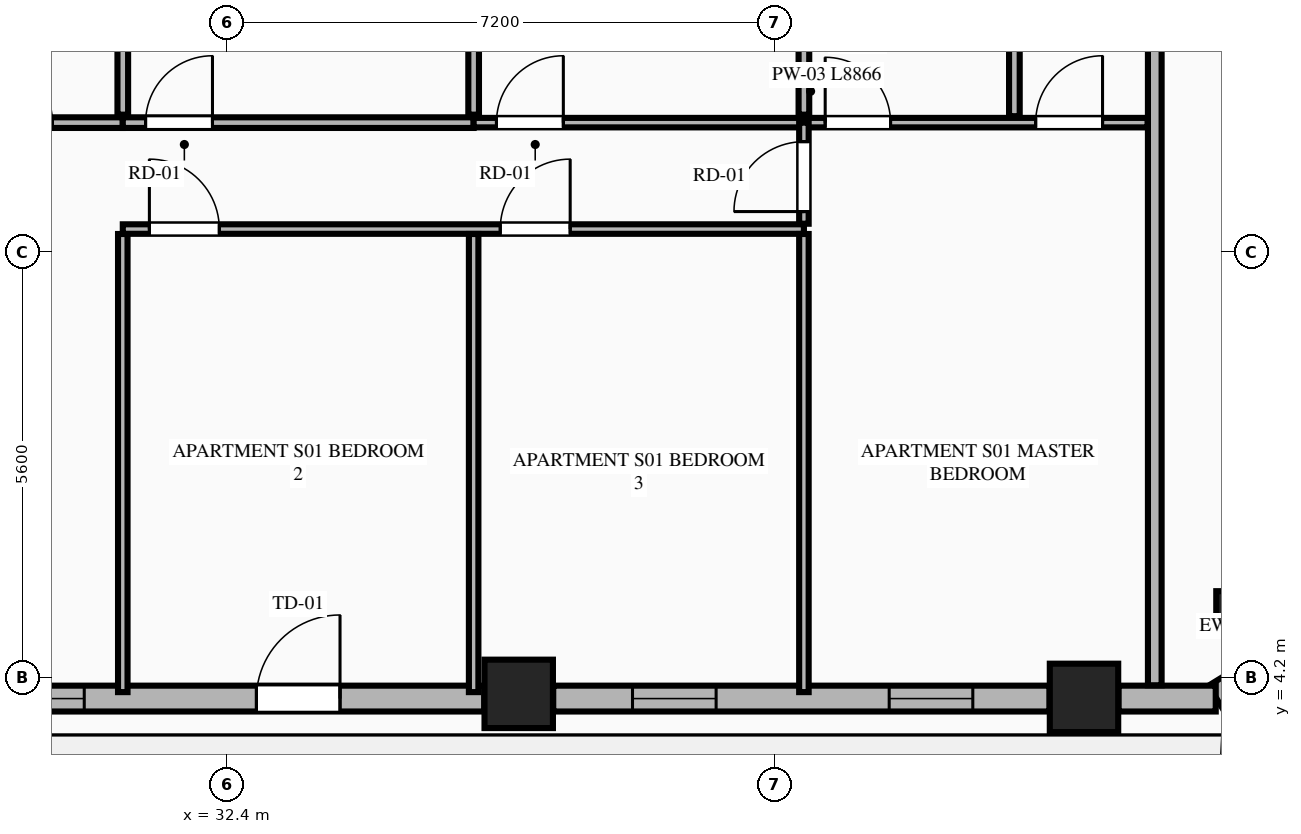
"""IFC4 building model, lengths in metres.
Left out: names, types, materials, properties, quantities, classifications, styles, units other than length and angle.
Written with IfcOpenShell. Run it as: python <this file> out.ifc"""

import sys

from ifc_helpers import new_model, si_unit, direction, frame, frame_2d, origin, origin_2d, place, context, subcontext, project, spatial, rectangle, extrude, element, fill, save


model = new_model("IFC4")
c1 = context("Model", 3, precision=1e-05, world=origin(), true_north=direction((0.0, 1.0)))
c2 = subcontext(c1, "Body", "Model", "MODEL_VIEW")
j1 = project(units=[si_unit("LENGTHUNIT", "METRE"), si_unit("PLANEANGLEUNIT", "RADIAN")], contexts=[c1])
p1 = place(None, origin())
s1 = spatial("IfcSite", under=j1, at=p1, CompositionType="ELEMENT")
p2 = place(p1, origin())
s2 = spatial("IfcBuilding", under=s1, at=p2, CompositionType="ELEMENT")
p3 = place(p2, frame((0.0, 0.0, 160.6)))
s3 = spatial("IfcBuildingStorey", under=s2, at=p3, CompositionType="ELEMENT", Elevation=160.6)
for number, where, z_axis, x_axis in (
    (1, (36.232, 3.992, 0.0), (0.0, 0.0, 1.0), (1.0, 0.0, 0.0)),
    (2, (43.669, 3.939, 0.0), (0.0, 0.0, 1.0), (1.0, 0.0, 0.0)),
):
    element("IfcColumn", number, at=place(p3, frame(where, z_axis=z_axis, x_axis=x_axis)), inside=s3, PredefinedType="COLUMN", context=c2, shape_type="SweptSolid", body=[
        extrude(rectangle(XDim=0.9, YDim=0.9, at=origin_2d()), origin(), (0.0, 0.0, 1.0), 3.55),
    ])
p4 = place(p3, frame((45.659, 5.093, 0.0), z_axis=(0.0, 0.0, 1.0), x_axis=(0.865160173452, 0.501495637342, 0.0)))
e3 = element("IfcColumn", 3, at=p4, inside=s3, PredefinedType="PILASTER", context=c2, shape_type="SweptSolid", body=[
    extrude(rectangle(XDim=0.5, YDim=0.35, at=origin_2d()), origin(), (0.0, 0.0, 1.0), 3.55),
])
p5 = place(p3, frame((45.397, 3.955, 0.0), z_axis=(0.0, 0.0, 1.0), x_axis=(0.851798915137, 0.523868884523, 0.0)))
e4 = element("IfcWall", 4, at=p5, inside=s3, PredefinedType="STANDARD", context=c2, shape_type="SweptSolid", body=[
    extrude(rectangle(XDim=1.848, YDim=0.34, at=frame_2d((0.924, 0.0))), origin(), (0.0, 0.0, 1.0), 3.34),
])
p6 = place(p3, frame((29.022, 3.93, 0.0), z_axis=(0.0, 0.0, 1.0), x_axis=(1.0, 0.0, 0.0)))
e5 = element("IfcWall", 5, at=p6, inside=s3, PredefinedType="STANDARD", context=c2, shape_type="SweptSolid", body=[
    extrude(rectangle(XDim=6.756, YDim=0.34, at=frame_2d((3.378, 0.0))), origin(), (0.0, 0.0, 1.0), 2.797),
])
p7 = place(p6, frame((3.759, 0.0, 0.0)))
e6 = element("IfcOpeningElement", 6, at=p7, cuts=e5, PredefinedType="OPENING", context=c2, shape_type="SweptSolid", body=[
    extrude(rectangle(XDim=1.1, YDim=2.25, at=frame_2d((0.55, 1.125))), frame((0.0, 0.18, 0.0), z_axis=(0.0, -1.0, 0.0), x_axis=(1.0, 0.0, 0.0)), (0.0, 0.0, 1.0), 0.36),
])
p8 = place(p6, frame((0.394, 0.0, 0.75)))
e7 = element("IfcOpeningElement", 7, at=p8, cuts=e5, PredefinedType="OPENING", context=c2, shape_type="SweptSolid", body=[
    extrude(rectangle(XDim=1.1, YDim=1.897, at=frame_2d((0.55, 0.948))), frame((0.0, 0.18, 0.0), z_axis=(0.0, -1.0, 0.0), x_axis=(1.0, 0.0, 0.0)), (0.0, 0.0, 1.0), 0.36),
])
p9 = place(p3, frame((36.686, 3.93, 0.0), z_axis=(0.0, 0.0, 1.0), x_axis=(1.0, 0.0, 0.0)))
e8 = element("IfcWall", 8, at=p9, inside=s3, PredefinedType="STANDARD", context=c2, shape_type="SweptSolid", body=[
    extrude(rectangle(XDim=6.529, YDim=0.34, at=frame_2d((3.265, 0.0))), origin(), (0.0, 0.0, 1.0), 2.797),
])
p10 = place(p9, frame((1.043, 0.0, 0.75)))
e9 = element("IfcOpeningElement", 9, at=p10, cuts=e8, PredefinedType="OPENING", context=c2, shape_type="SweptSolid", body=[
    extrude(rectangle(XDim=1.1, YDim=1.897, at=frame_2d((0.55, 0.948))), frame((0.0, 0.18, 0.0), z_axis=(0.0, -1.0, 0.0), x_axis=(1.0, 0.0, 0.0)), (0.0, 0.0, 1.0), 0.36),
])
p11 = place(p9, frame((4.42, 0.0, 0.75)))
e10 = element("IfcOpeningElement", 10, at=p11, cuts=e8, PredefinedType="OPENING", context=c2, shape_type="SweptSolid", body=[
    extrude(rectangle(XDim=1.1, YDim=1.897, at=frame_2d((0.55, 0.948))), frame((0.0, 0.18, 0.0), z_axis=(0.0, -1.0, 0.0), x_axis=(1.0, 0.0, 0.0)), (0.0, 0.0, 1.0), 0.36),
])
p12 = place(p3, frame((44.123, 3.93, 0.0), z_axis=(0.0, 0.0, 1.0), x_axis=(1.0, 0.0, 0.0)))
e11 = element("IfcWall", 11, at=p12, inside=s3, PredefinedType="STANDARD", context=c2, shape_type="SweptSolid", body=[
    extrude(rectangle(XDim=1.279, YDim=0.34, at=frame_2d((0.64, 0.0))), origin(), (0.0, 0.0, 1.0), 3.34),
])
p13 = place(p3, frame((44.6, 4.105, 0.0), z_axis=(0.0, 0.0, 1.0), x_axis=(0.0, 1.0, 0.0)))
e12 = element("IfcWall", 12, at=p13, inside=s3, PredefinedType="PARTITIONING", context=c2, shape_type="SweptSolid", body=[
    extrude(rectangle(XDim=12.545, YDim=0.18, at=frame_2d((6.272, 0.0))), origin(), (0.0, 0.0, 1.0), 3.34),
])
p14 = place(p3, frame((22.25, 11.507, 0.0), z_axis=(0.0, 0.0, 1.0), x_axis=(1.0, 0.0, 0.0)))
e13 = element("IfcWall", 13, at=p14, inside=s3, PredefinedType="PLUMBINGWALL", context=c2, shape_type="SweptSolid", body=[
    extrude(rectangle(XDim=8.773, YDim=0.14, at=frame_2d((4.386, 0.0))), origin(), (0.0, 0.0, 1.0), 3.34),
])
p15 = place(p14, frame((6.988, 0.0, 0.0)))
e14 = element("IfcOpeningElement", 14, at=p15, cuts=e13, PredefinedType="OPENING", context=c2, shape_type="SweptSolid", body=[
    extrude(rectangle(XDim=0.86, YDim=2.1, at=frame_2d((0.43, 1.05))), frame((0.0, 0.08, 0.0), z_axis=(0.0, -1.0, 0.0), x_axis=(1.0, 0.0, 0.0)), (0.0, 0.0, 1.0), 0.16),
])
p16 = place(p14, frame((0.26, 0.0, 0.0)))
e15 = element("IfcOpeningElement", 15, at=p16, cuts=e13, PredefinedType="OPENING", context=c2, shape_type="SweptSolid", body=[
    extrude(rectangle(XDim=0.88, YDim=2.15, at=frame_2d((0.44, 1.075))), frame((0.0, 0.08, 0.0), z_axis=(0.0, -1.0, 0.0), x_axis=(1.0, 0.0, 0.0)), (0.0, 0.0, 1.0), 0.16),
])
p17 = place(p14, frame((4.254, 0.0, 0.0)))
e16 = element("IfcOpeningElement", 16, at=p17, cuts=e13, PredefinedType="OPENING", context=c2, shape_type="SweptSolid", body=[
    extrude(rectangle(XDim=0.88, YDim=2.15, at=frame_2d((0.44, 1.075))), frame((0.0, 0.08, 0.0), z_axis=(0.0, -1.0, 0.0), x_axis=(1.0, 0.0, 0.0)), (0.0, 0.0, 1.0), 0.16),
])
p18 = place(p3, frame((31.023, 11.507, 0.0), z_axis=(0.0, 0.0, 1.0), x_axis=(1.0, 0.0, 0.0)))
e17 = element("IfcWall", 17, at=p18, inside=s3, PredefinedType="PLUMBINGWALL", context=c2, shape_type="SweptSolid", body=[
    extrude(rectangle(XDim=4.616, YDim=0.14, at=frame_2d((2.308, 0.0))), origin(), (0.0, 0.0, 1.0), 3.34),
])
p19 = place(p18, frame((0.3, 0.0, 0.0)))
e18 = element("IfcOpeningElement", 18, at=p19, cuts=e17, PredefinedType="OPENING", context=c2, shape_type="SweptSolid", body=[
    extrude(rectangle(XDim=0.88, YDim=2.15, at=frame_2d((0.44, 1.075))), frame((0.0, 0.08, 0.0), z_axis=(0.0, -1.0, 0.0), x_axis=(1.0, 0.0, 0.0)), (0.0, 0.0, 1.0), 0.16),
])
p20 = place(p3, frame((35.639, 11.507, 0.0), z_axis=(0.0, 0.0, 1.0), x_axis=(1.0, 0.0, 0.0)))
e19 = element("IfcWall", 19, at=p20, inside=s3, PredefinedType="PARTITIONING", context=c2, shape_type="SweptSolid", body=[
    extrude(rectangle(XDim=8.866, YDim=0.125, at=frame_2d((4.433, 0.0))), origin(), (0.0, 0.0, 1.0), 3.34),
])
p21 = place(p20, frame((4.625, 0.0, 0.0)))
e20 = element("IfcOpeningElement", 20, at=p21, cuts=e19, PredefinedType="OPENING", context=c2, shape_type="SweptSolid", body=[
    extrude(rectangle(XDim=0.86, YDim=2.1, at=frame_2d((0.43, 1.05))), frame((0.0, 0.073, 0.0), z_axis=(0.0, -1.0, 0.0), x_axis=(1.0, 0.0, 0.0)), (0.0, 0.0, 1.0), 0.145),
])
p22 = place(p20, frame((7.394, 0.0, 0.0)))
e21 = element("IfcOpeningElement", 21, at=p22, cuts=e19, PredefinedType="OPENING", context=c2, shape_type="SweptSolid", body=[
    extrude(rectangle(XDim=0.88, YDim=2.15, at=frame_2d((0.44, 1.075))), frame((0.0, 0.073, 0.0), z_axis=(0.0, -1.0, 0.0), x_axis=(1.0, 0.0, 0.0)), (0.0, 0.0, 1.0), 0.145),
])
p23 = place(p20, frame((0.3, 0.0, 0.0)))
e22 = element("IfcOpeningElement", 22, at=p23, cuts=e19, PredefinedType="OPENING", context=c2, shape_type="SweptSolid", body=[
    extrude(rectangle(XDim=0.88, YDim=2.15, at=frame_2d((0.44, 1.075))), frame((0.0, 0.073, 0.0), z_axis=(0.0, -1.0, 0.0), x_axis=(1.0, 0.0, 0.0)), (0.0, 0.0, 1.0), 0.145),
])
p24 = place(p3, frame((31.023, 4.015, 0.0), z_axis=(0.0, 0.0, 1.0), x_axis=(0.0, 1.0, 0.0)))
e23 = element("IfcWall", 23, at=p24, inside=s3, PredefinedType="PARTITIONING", context=c2, shape_type="SweptSolid", body=[
    extrude(rectangle(XDim=6.027, YDim=0.125, at=frame_2d((3.014, 0.0))), origin(), (0.0, 0.0, 1.0), 3.34),
])
p25 = place(p3, frame((31.023, 10.107, 0.0), z_axis=(0.0, 0.0, 1.0), x_axis=(1.0, 0.0, 0.0)))
e24 = element("IfcWall", 24, at=p25, inside=s3, PredefinedType="PARTITIONING", context=c2, shape_type="SweptSolid", body=[
    extrude(rectangle(XDim=8.961, YDim=0.125, at=frame_2d((4.48, 0.0))), origin(), (0.0, 0.0, 1.0), 3.34),
])
p26 = place(p25, frame((0.35, 0.0, 0.0)))
e25 = element("IfcOpeningElement", 25, at=p26, cuts=e24, PredefinedType="OPENING", context=c2, shape_type="SweptSolid", body=[
    extrude(rectangle(XDim=0.92, YDim=2.15, at=frame_2d((0.46, 1.075))), frame((0.0, 0.073, 0.0), z_axis=(0.0, -1.0, 0.0), x_axis=(1.0, 0.0, 0.0)), (0.0, 0.0, 1.0), 0.145),
])
p27 = place(p25, frame((4.966, 0.0, 0.0)))
e26 = element("IfcOpeningElement", 26, at=p27, cuts=e24, PredefinedType="OPENING", context=c2, shape_type="SweptSolid", body=[
    extrude(rectangle(XDim=0.92, YDim=2.15, at=frame_2d((0.46, 1.075))), frame((0.0, 0.073, 0.0), z_axis=(0.0, -1.0, 0.0), x_axis=(1.0, 0.0, 0.0)), (0.0, 0.0, 1.0), 0.145),
])
p28 = place(p3, frame((39.984, 10.177, 0.0), z_axis=(0.0, 0.0, 1.0), x_axis=(0.0, 1.0, 0.0)))
e27 = element("IfcWall", 27, at=p28, inside=s3, PredefinedType="PARTITIONING", context=c2, shape_type="SweptSolid", body=[
    extrude(rectangle(XDim=1.33, YDim=0.125, at=frame_2d((0.665, 0.0))), origin(), (0.0, 0.0, 1.0), 3.34),
])
p29 = place(p28, frame((0.16, 0.0, 0.0)))
e28 = element("IfcOpeningElement", 28, at=p29, cuts=e27, PredefinedType="OPENING", context=c2, shape_type="SweptSolid", body=[
    extrude(rectangle(XDim=0.92, YDim=2.15, at=frame_2d((0.46, 1.075))), frame((0.0, 0.073, 0.0), z_axis=(0.0, -1.0, 0.0), x_axis=(1.0, 0.0, 0.0)), (0.0, 0.0, 1.0), 0.145),
])
for number, where, z_axis, x_axis in (
    (29, (31.023, 11.612, 0.0), (0.0, 0.0, 1.0), (0.0, 1.0, 0.0)),
    (30, (35.639, 11.612, 0.0), (0.0, 0.0, 1.0), (0.0, 1.0, 0.0)),
):
    element("IfcWall", number, at=place(p3, frame(where, z_axis=z_axis, x_axis=x_axis)), inside=s3, PredefinedType="PLUMBINGWALL", context=c2, shape_type="SweptSolid", body=[
        extrude(rectangle(XDim=4.953, YDim=0.14, at=frame_2d((2.477, 0.0))), origin(), (0.0, 0.0, 1.0), 3.34),
    ])
for number, where, z_axis, x_axis in (
    (31, (35.639, 4.015, 0.0), (0.0, 0.0, 1.0), (0.0, 1.0, 0.0)),
    (32, (39.984, 4.015, 0.0), (0.0, 0.0, 1.0), (0.0, 1.0, 0.0)),
):
    element("IfcWall", number, at=place(p3, frame(where, z_axis=z_axis, x_axis=x_axis)), inside=s3, PredefinedType="PARTITIONING", context=c2, shape_type="SweptSolid", body=[
        extrude(rectangle(XDim=6.027, YDim=0.125, at=frame_2d((3.014, 0.0))), origin(), (0.0, 0.0, 1.0), 3.34),
    ])
p30 = place(p3, frame((39.984, 11.612, 0.0), z_axis=(0.0, 0.0, 1.0), x_axis=(0.0, 1.0, 0.0)))
e33 = element("IfcWall", 33, at=p30, inside=s3, PredefinedType="PLUMBINGWALL", context=c2, shape_type="SweptSolid", body=[
    extrude(rectangle(XDim=4.953, YDim=0.14, at=frame_2d((2.477, 0.0))), origin(), (0.0, 0.0, 1.0), 3.34),
])
p31 = place(p3, frame((42.753, 11.592, 0.0), z_axis=(0.0, 0.0, 1.0), x_axis=(0.0, 1.0, 0.0)))
e34 = element("IfcWall", 34, at=p31, inside=s3, PredefinedType="PLUMBINGWALL", context=c2, shape_type="SweptSolid", body=[
    extrude(rectangle(XDim=4.973, YDim=0.14, at=frame_2d((2.486, 0.0))), origin(), (0.0, 0.0, 1.0), 2.722),
])
p32 = place(p7, origin())
e35 = element("IfcDoor", 35, at=p32, inside=s3, OperationType="SINGLE_SWING_RIGHT", PredefinedType="DOOR", context=c2, shape_type="SweptSolid", body=[
    extrude(rectangle(XDim=1.1, YDim=2.25, at=frame_2d((0.55, 1.125))), frame((0.0, 0.025, 0.0), z_axis=(0.0, -1.0, 0.0), x_axis=(1.0, 0.0, 0.0)), (0.0, 0.0, 1.0), 0.05),
])
fill(e6, e35)
p33 = place(p10, origin())
e36 = element("IfcWindow", 36, at=p33, inside=s3, PartitioningType="SINGLE_PANEL", PredefinedType="WINDOW", context=c2, shape_type="SweptSolid", body=[
    extrude(rectangle(XDim=1.1, YDim=1.897, at=frame_2d((0.55, 0.948))), frame((0.0, 0.03, 0.0), z_axis=(0.0, -1.0, 0.0), x_axis=(1.0, 0.0, 0.0)), (0.0, 0.0, 1.0), 0.06),
])
fill(e9, e36)
p34 = place(p21, origin())
e37 = element("IfcDoor", 37, at=p34, inside=s3, OperationType="SINGLE_SWING_LEFT", PredefinedType="DOOR", context=c2, shape_type="SweptSolid", body=[
    extrude(rectangle(XDim=0.86, YDim=2.1, at=frame_2d((0.43, 1.05))), frame((0.0, 0.025, 0.0), z_axis=(0.0, -1.0, 0.0), x_axis=(1.0, 0.0, 0.0)), (0.0, 0.0, 1.0), 0.05),
])
fill(e20, e37)
p35 = place(p22, origin())
e38 = element("IfcDoor", 38, at=p35, inside=s3, OperationType="SINGLE_SWING_RIGHT", PredefinedType="DOOR", context=c2, shape_type="SweptSolid", body=[
    extrude(rectangle(XDim=0.88, YDim=2.15, at=frame_2d((0.44, 1.075))), frame((0.0, 0.025, 0.0), z_axis=(0.0, -1.0, 0.0), x_axis=(1.0, 0.0, 0.0)), (0.0, 0.0, 1.0), 0.05),
])
fill(e21, e38)
p36 = place(p19, origin())
e39 = element("IfcDoor", 39, at=p36, inside=s3, OperationType="SINGLE_SWING_RIGHT", PredefinedType="DOOR", context=c2, shape_type="SweptSolid", body=[
    extrude(rectangle(XDim=0.88, YDim=2.15, at=frame_2d((0.44, 1.075))), frame((0.0, 0.025, 0.0), z_axis=(0.0, -1.0, 0.0), x_axis=(1.0, 0.0, 0.0)), (0.0, 0.0, 1.0), 0.05),
])
fill(e18, e39)
p37 = place(p26, origin())
e40 = element("IfcDoor", 40, at=p37, inside=s3, OperationType="SINGLE_SWING_LEFT", PredefinedType="DOOR", context=c2, shape_type="SweptSolid", body=[
    extrude(rectangle(XDim=0.92, YDim=2.15, at=frame_2d((0.46, 1.075))), frame((0.0, 0.025, 0.0), z_axis=(0.0, -1.0, 0.0), x_axis=(1.0, 0.0, 0.0)), (0.0, 0.0, 1.0), 0.05),
])
fill(e25, e40)
p38 = place(p27, origin())
e41 = element("IfcDoor", 41, at=p38, inside=s3, OperationType="SINGLE_SWING_RIGHT", PredefinedType="DOOR", context=c2, shape_type="SweptSolid", body=[
    extrude(rectangle(XDim=0.92, YDim=2.15, at=frame_2d((0.46, 1.075))), frame((0.0, 0.025, 0.0), z_axis=(0.0, -1.0, 0.0), x_axis=(1.0, 0.0, 0.0)), (0.0, 0.0, 1.0), 0.05),
])
fill(e26, e41)
p39 = place(p29, origin())
e42 = element("IfcDoor", 42, at=p39, inside=s3, OperationType="SINGLE_SWING_LEFT", PredefinedType="DOOR", context=c2, shape_type="SweptSolid", body=[
    extrude(rectangle(XDim=0.92, YDim=2.15, at=frame_2d((0.46, 1.075))), frame((0.0, 0.025, 0.0), z_axis=(0.0, -1.0, 0.0), x_axis=(1.0, 0.0, 0.0)), (0.0, 0.0, 1.0), 0.05),
])
fill(e28, e42)
p40 = place(p23, origin())
e43 = element("IfcDoor", 43, at=p40, inside=s3, OperationType="SINGLE_SWING_RIGHT", PredefinedType="DOOR", context=c2, shape_type="SweptSolid", body=[
    extrude(rectangle(XDim=0.88, YDim=2.15, at=frame_2d((0.44, 1.075))), frame((0.0, 0.025, 0.0), z_axis=(0.0, -1.0, 0.0), x_axis=(1.0, 0.0, 0.0)), (0.0, 0.0, 1.0), 0.05),
])
fill(e22, e43)
p41 = place(p8, origin())
e44 = element("IfcWindow", 44, at=p41, inside=s3, PartitioningType="SINGLE_PANEL", PredefinedType="WINDOW", context=c2, shape_type="SweptSolid", body=[
    extrude(rectangle(XDim=1.1, YDim=1.897, at=frame_2d((0.55, 0.948))), frame((0.0, 0.03, 0.0), z_axis=(0.0, -1.0, 0.0), x_axis=(1.0, 0.0, 0.0)), (0.0, 0.0, 1.0), 0.06),
])
fill(e7, e44)
p42 = place(p11, origin())
e45 = element("IfcWindow", 45, at=p42, inside=s3, PartitioningType="SINGLE_PANEL", PredefinedType="WINDOW", context=c2, shape_type="SweptSolid", body=[
    extrude(rectangle(XDim=1.1, YDim=1.897, at=frame_2d((0.55, 0.948))), frame((0.0, 0.03, 0.0), z_axis=(0.0, -1.0, 0.0), x_axis=(1.0, 0.0, 0.0)), (0.0, 0.0, 1.0), 0.06),
])
fill(e10, e45)
save(model, sys.argv[1])
